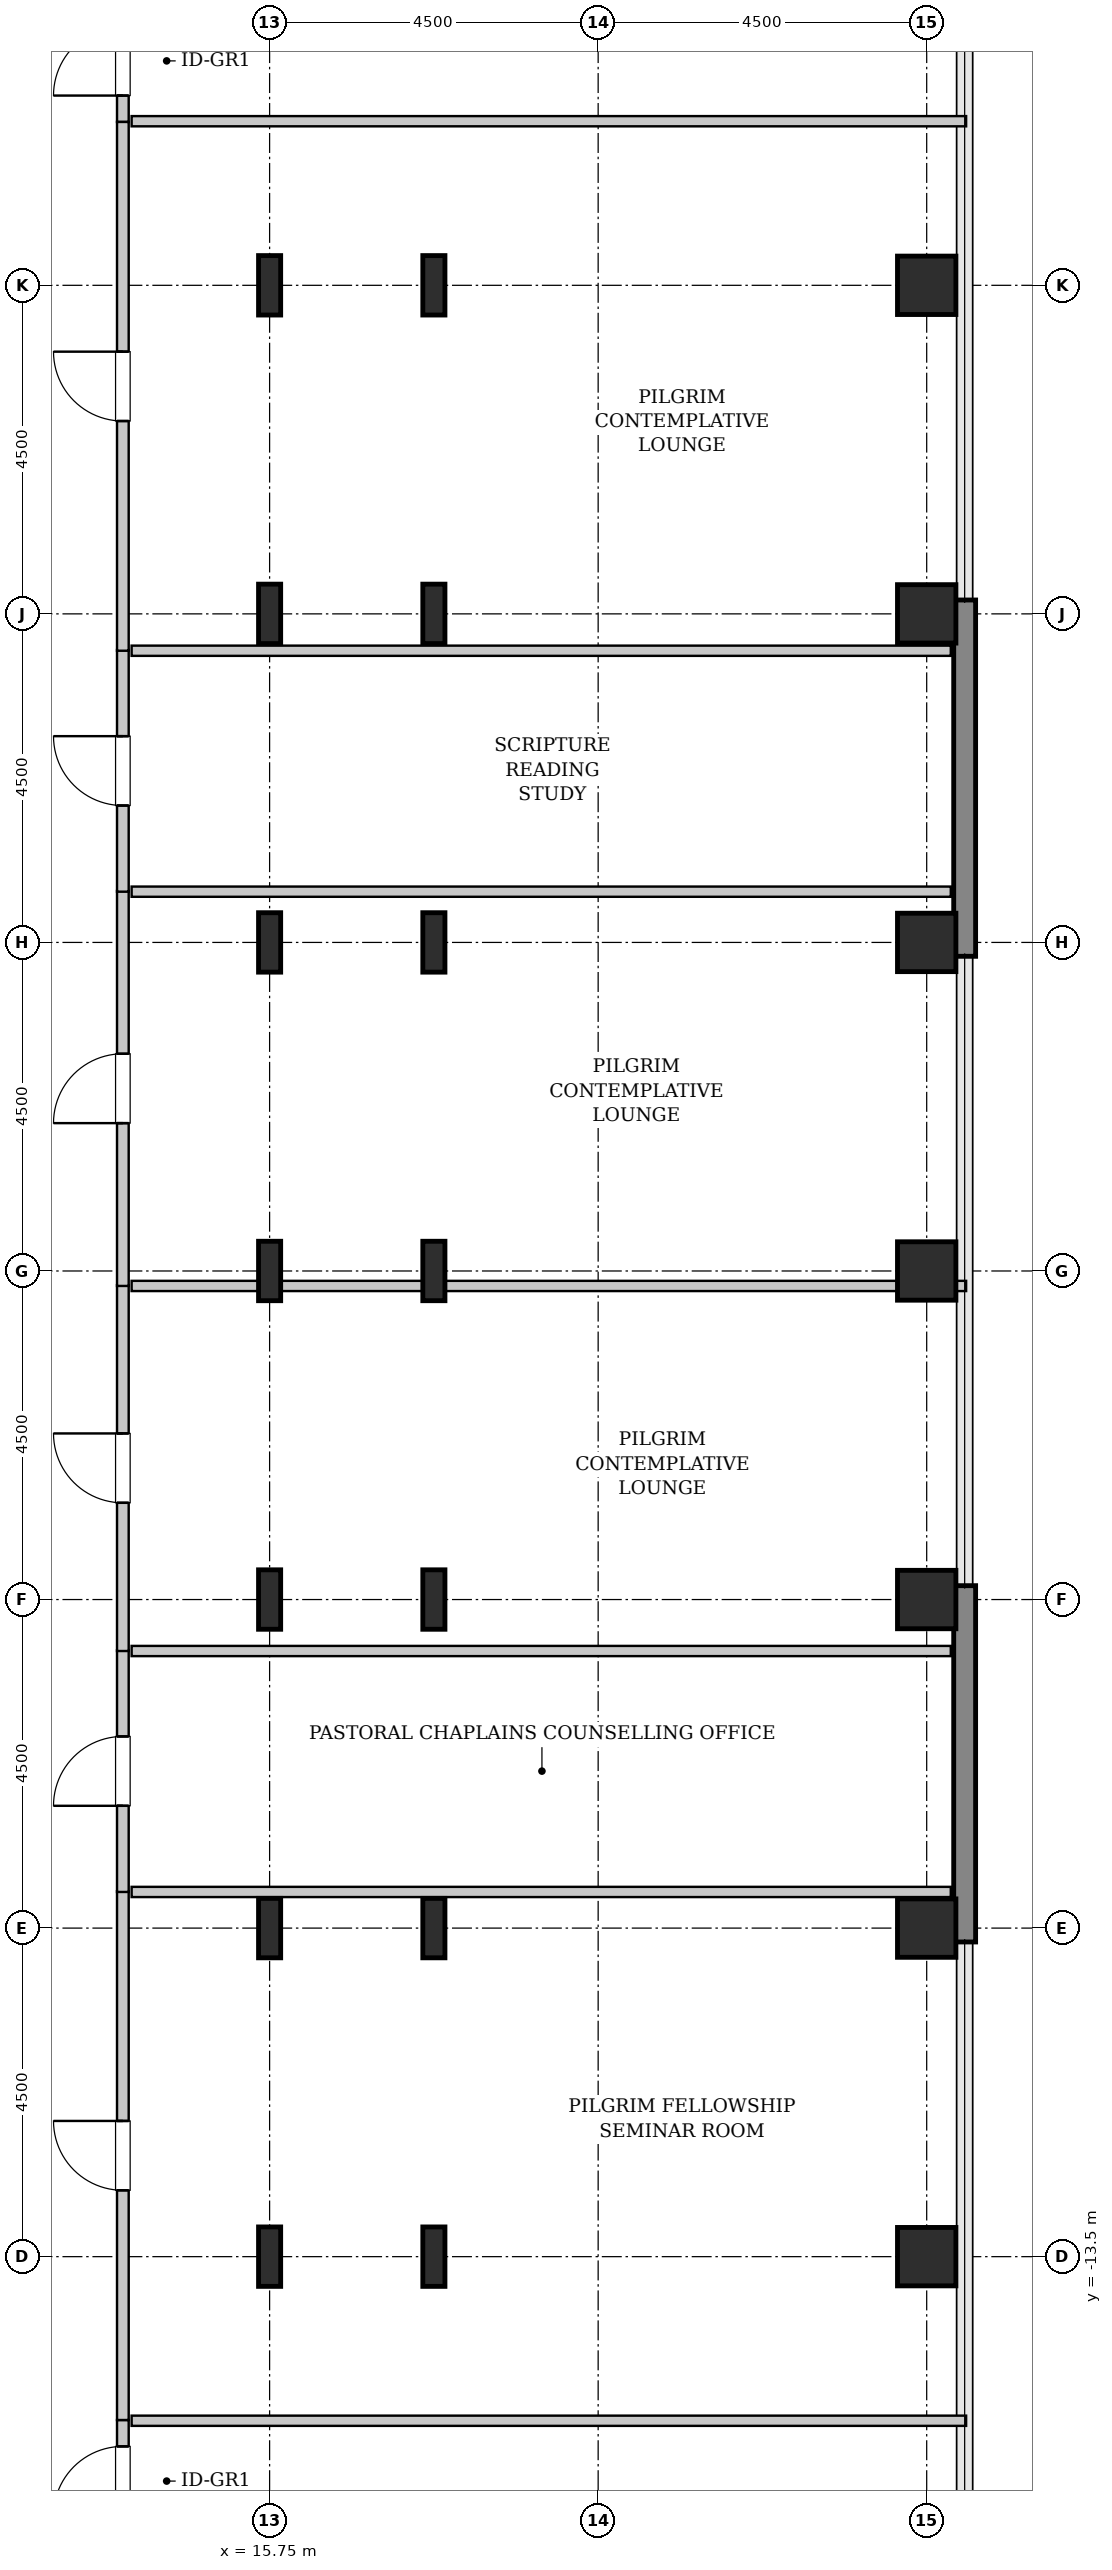
"""IFC4 building model, lengths in metres.
Left out: names, types, materials, properties, quantities, classifications, styles, units other than length and angle.
Written with IfcOpenShell. Run it as: python <this file> out.ifc"""

import sys

from ifc_helpers import new_model, si_unit, direction, frame, frame_2d, origin, origin_2d, place, context, subcontext, project, spatial, rectangle, hollow_rectangle, i_section, extrude, source, transform, mapped, element, fill, save


model = new_model("IFC4")
c1 = context("Model", 3, precision=1e-05, world=origin(), true_north=direction((0.0, 1.0)))
c2 = subcontext(c1, "Body", "Model", "MODEL_VIEW")
j1 = project(units=[si_unit("LENGTHUNIT", "METRE"), si_unit("PLANEANGLEUNIT", "RADIAN")], contexts=[c1])
p1 = place(None, origin())
s1 = spatial("IfcSite", under=j1, at=p1, CompositionType="ELEMENT")
p2 = place(p1, origin())
s2 = spatial("IfcBuilding", under=s1, at=p2, CompositionType="ELEMENT")
p3 = place(p2, frame((0.0, 0.0, 171.6)))
s3 = spatial("IfcBuildingStorey", under=s2, at=p3, CompositionType="ELEMENT", Elevation=171.6)
m1 = source(origin(), c2, "Body", "SweptSolid", [
    extrude(i_section(OverallWidth=0.303, OverallDepth=0.814, WebThickness=0.021, FlangeThickness=0.04, FilletRadius=0.03, at=origin_2d()), origin(), (0.0, 0.0, 1.0), 3.8),
])
for number, where, z_axis, x_axis in (
    (1, (15.75, -13.5, 0.0), (0.0, 0.0, 1.0), (1.0, 0.0, 0.0)),
    (2, (15.75, -9.0, 0.0), (0.0, 0.0, 1.0), (1.0, 0.0, 0.0)),
    (3, (15.75, -4.5, 0.0), (0.0, 0.0, 1.0), (1.0, 0.0, 0.0)),
    (4, (15.75, 0.0, 0.0), (0.0, 0.0, 1.0), (1.0, 0.0, 0.0)),
    (5, (15.75, 4.5, 0.0), (0.0, 0.0, 1.0), (1.0, 0.0, 0.0)),
    (6, (15.75, 9.0, 0.0), (0.0, 0.0, 1.0), (1.0, 0.0, 0.0)),
    (7, (15.75, 13.5, 0.0), (0.0, 0.0, 1.0), (1.0, 0.0, 0.0)),
    (8, (18.0, -13.5, 0.0), (0.0, 0.0, 1.0), (1.0, 0.0, 0.0)),
    (9, (18.0, -9.0, 0.0), (0.0, 0.0, 1.0), (1.0, 0.0, 0.0)),
    (10, (18.0, -4.5, 0.0), (0.0, 0.0, 1.0), (1.0, 0.0, 0.0)),
    (11, (18.0, 0.0, 0.0), (0.0, 0.0, 1.0), (1.0, 0.0, 0.0)),
    (12, (18.0, 4.5, 0.0), (0.0, 0.0, 1.0), (1.0, 0.0, 0.0)),
    (13, (18.0, 9.0, 0.0), (0.0, 0.0, 1.0), (1.0, 0.0, 0.0)),
    (14, (18.0, 13.5, 0.0), (0.0, 0.0, 1.0), (1.0, 0.0, 0.0)),
):
    element("IfcColumn", number, at=place(p3, frame(where, z_axis=z_axis, x_axis=x_axis)), inside=s3, PredefinedType="COLUMN", context=c2, shape_type="MappedRepresentation", body=[
        mapped(m1, transform((0.0, 0.0, 0.0), x_axis=(1.0, 0.0, 0.0), y_axis=(0.0, 1.0, 0.0), z_axis=(0.0, 0.0, 1.0), scale=1.0)),
    ])
m2 = source(origin(), c2, "Body", "SweptSolid", [
    extrude(hollow_rectangle(XDim=0.8, YDim=0.8, WallThickness=0.04, InnerFilletRadius=0.04, OuterFilletRadius=0.08, at=origin_2d()), origin(), (0.0, 0.0, 1.0), 3.8),
])
for number, where, z_axis, x_axis in (
    (15, (24.75, -13.5, 0.0), (0.0, 0.0, 1.0), (1.0, 0.0, 0.0)),
    (16, (24.75, -9.0, 0.0), (0.0, 0.0, 1.0), (1.0, 0.0, 0.0)),
    (17, (24.75, -4.5, 0.0), (0.0, 0.0, 1.0), (1.0, 0.0, 0.0)),
    (18, (24.75, 0.0, 0.0), (0.0, 0.0, 1.0), (1.0, 0.0, 0.0)),
    (19, (24.75, 4.5, 0.0), (0.0, 0.0, 1.0), (1.0, 0.0, 0.0)),
    (20, (24.75, 9.0, 0.0), (0.0, 0.0, 1.0), (1.0, 0.0, 0.0)),
    (21, (24.75, 13.5, 0.0), (0.0, 0.0, 1.0), (1.0, 0.0, 0.0)),
):
    element("IfcColumn", number, at=place(p3, frame(where, z_axis=z_axis, x_axis=x_axis)), inside=s3, PredefinedType="COLUMN", context=c2, shape_type="MappedRepresentation", body=[
        mapped(m2, transform((0.0, 0.0, 0.0), x_axis=(1.0, 0.0, 0.0), y_axis=(0.0, 1.0, 0.0), z_axis=(0.0, 0.0, 1.0), scale=1.0)),
    ])
m3 = source(origin(), c2, "Body", "SweptSolid", [
    extrude(rectangle(XDim=4.88, YDim=0.3, at=frame_2d((2.44, 0.0))), origin(), (0.0, 0.0, 1.0), 3.55),
])
for number, where, z_axis, x_axis in (
    (22, (25.27, -9.19, 0.0), (0.0, 0.0, 1.0), (0.0, 1.0, 0.0)),
    (23, (25.27, 4.31, 0.0), (0.0, 0.0, 1.0), (0.0, 1.0, 0.0)),
):
    element("IfcWall", number, at=place(p3, frame(where, z_axis=z_axis, x_axis=x_axis)), inside=s3, PredefinedType="SHEAR", context=c2, shape_type="MappedRepresentation", body=[
        mapped(m3, transform((0.0, 0.0, 0.0), x_axis=(1.0, 0.0, 0.0), y_axis=(0.0, 1.0, 0.0), z_axis=(0.0, 0.0, 1.0), scale=1.0)),
    ])
m4 = source(origin(), c2, "Body", "SweptSolid", [
    extrude(rectangle(XDim=7.302, YDim=0.16, at=frame_2d((3.651, 0.0))), origin(), (0.0, 0.0, 1.0), 3.535),
])
p4 = place(p3, frame((13.74, -23.04, 0.0), z_axis=(0.0, 0.0, 1.0), x_axis=(0.0, 1.0, 0.0)))
e24 = element("IfcWall", 24, at=p4, inside=s3, PredefinedType="PARTITIONING", context=c2, shape_type="MappedRepresentation", body=[
    mapped(m4, transform((0.0, 0.0, 0.0), x_axis=(1.0, 0.0, 0.0), y_axis=(0.0, 1.0, 0.0), z_axis=(0.0, 0.0, 1.0), scale=1.0)),
])
p5 = place(p4, frame((5.991, 0.0, 0.0)))
e25 = element("IfcOpeningElement", 25, at=p5, cuts=e24, PredefinedType="OPENING", context=c2, shape_type="SweptSolid", body=[
    extrude(rectangle(XDim=0.95, YDim=2.1, at=frame_2d((0.475, 1.05))), frame((0.0, 0.09, 0.0), z_axis=(0.0, -1.0, 0.0), x_axis=(1.0, 0.0, 0.0)), (0.0, 0.0, 1.0), 0.18),
])
m5 = source(origin(), c2, "Body", "SweptSolid", [
    extrude(rectangle(XDim=11.43, YDim=0.14, at=frame_2d((5.715, 0.0))), origin(), (0.0, 0.0, 1.0), 3.535),
])
p6 = place(p3, frame((13.86, -15.748, 0.0), z_axis=(0.0, 0.0, 1.0), x_axis=(1.0, 0.0, 0.0)))
e26 = element("IfcWall", 26, at=p6, inside=s3, PredefinedType="PARTITIONING", context=c2, shape_type="MappedRepresentation", body=[
    mapped(m5, transform((0.0, 0.0, 0.0), x_axis=(1.0, 0.0, 0.0), y_axis=(0.0, 1.0, 0.0), z_axis=(0.0, 0.0, 1.0), scale=1.0)),
])
m6 = source(origin(), c2, "Body", "SweptSolid", [
    extrude(rectangle(XDim=7.242, YDim=0.16, at=frame_2d((3.621, 0.0))), origin(), (0.0, 0.0, 1.0), 3.535),
])
p7 = place(p3, frame((13.74, -15.738, 0.0), z_axis=(0.0, 0.0, 1.0), x_axis=(0.0, 1.0, 0.0)))
e27 = element("IfcWall", 27, at=p7, inside=s3, PredefinedType="PARTITIONING", context=c2, shape_type="MappedRepresentation", body=[
    mapped(m6, transform((0.0, 0.0, 0.0), x_axis=(1.0, 0.0, 0.0), y_axis=(0.0, 1.0, 0.0), z_axis=(0.0, 0.0, 1.0), scale=1.0)),
])
p8 = place(p7, frame((3.146, 0.0, 0.0)))
e28 = element("IfcOpeningElement", 28, at=p8, cuts=e27, PredefinedType="OPENING", context=c2, shape_type="SweptSolid", body=[
    extrude(rectangle(XDim=0.95, YDim=2.1, at=frame_2d((0.475, 1.05))), frame((0.0, 0.09, 0.0), z_axis=(0.0, -1.0, 0.0), x_axis=(1.0, 0.0, 0.0)), (0.0, 0.0, 1.0), 0.18),
])
m7 = source(origin(), c2, "Body", "SweptSolid", [
    extrude(rectangle(XDim=11.22, YDim=0.14, at=frame_2d((5.61, 0.0))), origin(), (0.0, 0.0, 1.0), 2.875),
])
p9 = place(p3, frame((13.86, -8.505, 0.0), z_axis=(0.0, 0.0, 1.0), x_axis=(1.0, 0.0, 0.0)))
e29 = element("IfcWall", 29, at=p9, inside=s3, PredefinedType="PARTITIONING", context=c2, shape_type="MappedRepresentation", body=[
    mapped(m7, transform((0.0, 0.0, 0.0), x_axis=(1.0, 0.0, 0.0), y_axis=(0.0, 1.0, 0.0), z_axis=(0.0, 0.0, 1.0), scale=1.0)),
])
m8 = source(origin(), c2, "Body", "SweptSolid", [
    extrude(rectangle(XDim=3.31, YDim=0.16, at=frame_2d((1.655, 0.0))), origin(), (0.0, 0.0, 1.0), 3.535),
])
p10 = place(p3, frame((13.74, -8.505, 0.0), z_axis=(0.0, 0.0, 1.0), x_axis=(0.0, 1.0, 0.0)))
e30 = element("IfcWall", 30, at=p10, inside=s3, PredefinedType="PARTITIONING", context=c2, shape_type="MappedRepresentation", body=[
    mapped(m8, transform((0.0, 0.0, 0.0), x_axis=(1.0, 0.0, 0.0), y_axis=(0.0, 1.0, 0.0), z_axis=(0.0, 0.0, 1.0), scale=1.0)),
])
p11 = place(p10, frame((1.18, 0.0, 0.0)))
e31 = element("IfcOpeningElement", 31, at=p11, cuts=e30, PredefinedType="OPENING", context=c2, shape_type="SweptSolid", body=[
    extrude(rectangle(XDim=0.95, YDim=2.1, at=frame_2d((0.475, 1.05))), frame((0.0, 0.09, 0.0), z_axis=(0.0, -1.0, 0.0), x_axis=(1.0, 0.0, 0.0)), (0.0, 0.0, 1.0), 0.18),
])
m9 = source(origin(), c2, "Body", "SweptSolid", [
    extrude(rectangle(XDim=11.22, YDim=0.14, at=frame_2d((5.61, 0.0))), origin(), (0.0, 0.0, 1.0), 3.535),
])
p12 = place(p3, frame((13.86, -5.205, 0.0), z_axis=(0.0, 0.0, 1.0), x_axis=(1.0, 0.0, 0.0)))
e32 = element("IfcWall", 32, at=p12, inside=s3, PredefinedType="PARTITIONING", context=c2, shape_type="MappedRepresentation", body=[
    mapped(m9, transform((0.0, 0.0, 0.0), x_axis=(1.0, 0.0, 0.0), y_axis=(0.0, 1.0, 0.0), z_axis=(0.0, 0.0, 1.0), scale=1.0)),
])
m10 = source(origin(), c2, "Body", "SweptSolid", [
    extrude(rectangle(XDim=5.01, YDim=0.16, at=frame_2d((2.505, 0.0))), origin(), (0.0, 0.0, 1.0), 3.535),
])
p13 = place(p3, frame((13.74, -5.205, 0.0), z_axis=(0.0, 0.0, 1.0), x_axis=(0.0, 1.0, 0.0)))
e33 = element("IfcWall", 33, at=p13, inside=s3, PredefinedType="PARTITIONING", context=c2, shape_type="MappedRepresentation", body=[
    mapped(m10, transform((0.0, 0.0, 0.0), x_axis=(1.0, 0.0, 0.0), y_axis=(0.0, 1.0, 0.0), z_axis=(0.0, 0.0, 1.0), scale=1.0)),
])
p14 = place(p13, frame((2.03, 0.0, 0.0)))
e34 = element("IfcOpeningElement", 34, at=p14, cuts=e33, PredefinedType="OPENING", context=c2, shape_type="SweptSolid", body=[
    extrude(rectangle(XDim=0.95, YDim=2.1, at=frame_2d((0.475, 1.05))), frame((0.0, 0.09, 0.0), z_axis=(0.0, -1.0, 0.0), x_axis=(1.0, 0.0, 0.0)), (0.0, 0.0, 1.0), 0.18),
])
m11 = source(origin(), c2, "Body", "SweptSolid", [
    extrude(rectangle(XDim=11.43, YDim=0.14, at=frame_2d((5.715, 0.0))), origin(), (0.0, 0.0, 1.0), 2.875),
])
p15 = place(p3, frame((13.86, -0.205, 0.0), z_axis=(0.0, 0.0, 1.0), x_axis=(1.0, 0.0, 0.0)))
e35 = element("IfcWall", 35, at=p15, inside=s3, PredefinedType="PARTITIONING", context=c2, shape_type="MappedRepresentation", body=[
    mapped(m11, transform((0.0, 0.0, 0.0), x_axis=(1.0, 0.0, 0.0), y_axis=(0.0, 1.0, 0.0), z_axis=(0.0, 0.0, 1.0), scale=1.0)),
])
m12 = source(origin(), c2, "Body", "SweptSolid", [
    extrude(rectangle(XDim=5.41, YDim=0.16, at=frame_2d((2.705, 0.0))), origin(), (0.0, 0.0, 1.0), 3.535),
])
p16 = place(p3, frame((13.74, -0.205, 0.0), z_axis=(0.0, 0.0, 1.0), x_axis=(0.0, 1.0, 0.0)))
e36 = element("IfcWall", 36, at=p16, inside=s3, PredefinedType="PARTITIONING", context=c2, shape_type="MappedRepresentation", body=[
    mapped(m12, transform((0.0, 0.0, 0.0), x_axis=(1.0, 0.0, 0.0), y_axis=(0.0, 1.0, 0.0), z_axis=(0.0, 0.0, 1.0), scale=1.0)),
])
p17 = place(p16, frame((2.23, 0.0, 0.0)))
e37 = element("IfcOpeningElement", 37, at=p17, cuts=e36, PredefinedType="OPENING", context=c2, shape_type="SweptSolid", body=[
    extrude(rectangle(XDim=0.95, YDim=2.1, at=frame_2d((0.475, 1.05))), frame((0.0, 0.09, 0.0), z_axis=(0.0, -1.0, 0.0), x_axis=(1.0, 0.0, 0.0)), (0.0, 0.0, 1.0), 0.18),
])
p18 = place(p3, frame((13.86, 5.195, 0.0), z_axis=(0.0, 0.0, 1.0), x_axis=(1.0, 0.0, 0.0)))
e38 = element("IfcWall", 38, at=p18, inside=s3, PredefinedType="PARTITIONING", context=c2, shape_type="MappedRepresentation", body=[
    mapped(m9, transform((0.0, 0.0, 0.0), x_axis=(1.0, 0.0, 0.0), y_axis=(0.0, 1.0, 0.0), z_axis=(0.0, 0.0, 1.0), scale=1.0)),
])
p19 = place(p3, frame((13.74, 5.195, 0.0), z_axis=(0.0, 0.0, 1.0), x_axis=(0.0, 1.0, 0.0)))
e39 = element("IfcWall", 39, at=p19, inside=s3, PredefinedType="PARTITIONING", context=c2, shape_type="MappedRepresentation", body=[
    mapped(m8, transform((0.0, 0.0, 0.0), x_axis=(1.0, 0.0, 0.0), y_axis=(0.0, 1.0, 0.0), z_axis=(0.0, 0.0, 1.0), scale=1.0)),
])
p20 = place(p19, frame((1.18, 0.0, 0.0)))
e40 = element("IfcOpeningElement", 40, at=p20, cuts=e39, PredefinedType="OPENING", context=c2, shape_type="SweptSolid", body=[
    extrude(rectangle(XDim=0.95, YDim=2.1, at=frame_2d((0.475, 1.05))), frame((0.0, 0.09, 0.0), z_axis=(0.0, -1.0, 0.0), x_axis=(1.0, 0.0, 0.0)), (0.0, 0.0, 1.0), 0.18),
])
p21 = place(p3, frame((13.86, 8.495, 0.0), z_axis=(0.0, 0.0, 1.0), x_axis=(1.0, 0.0, 0.0)))
e41 = element("IfcWall", 41, at=p21, inside=s3, PredefinedType="PARTITIONING", context=c2, shape_type="MappedRepresentation", body=[
    mapped(m7, transform((0.0, 0.0, 0.0), x_axis=(1.0, 0.0, 0.0), y_axis=(0.0, 1.0, 0.0), z_axis=(0.0, 0.0, 1.0), scale=1.0)),
])
p22 = place(p3, frame((13.74, 15.738, 0.0), z_axis=(0.0, 0.0, 1.0), x_axis=(0.0, 1.0, 0.0)))
e42 = element("IfcWall", 42, at=p22, inside=s3, PredefinedType="PARTITIONING", context=c2, shape_type="MappedRepresentation", body=[
    mapped(m4, transform((0.0, 0.0, 0.0), x_axis=(1.0, 0.0, 0.0), y_axis=(0.0, 1.0, 0.0), z_axis=(0.0, 0.0, 1.0), scale=1.0)),
])
p23 = place(p22, frame((0.361, 0.0, 0.0)))
e43 = element("IfcOpeningElement", 43, at=p23, cuts=e42, PredefinedType="OPENING", context=c2, shape_type="SweptSolid", body=[
    extrude(rectangle(XDim=0.95, YDim=2.1, at=frame_2d((0.475, 1.05))), frame((0.0, 0.09, 0.0), z_axis=(0.0, -1.0, 0.0), x_axis=(1.0, 0.0, 0.0)), (0.0, 0.0, 1.0), 0.18),
])
p24 = place(p3, frame((13.86, 15.748, 0.0), z_axis=(0.0, 0.0, 1.0), x_axis=(1.0, 0.0, 0.0)))
e44 = element("IfcWall", 44, at=p24, inside=s3, PredefinedType="PARTITIONING", context=c2, shape_type="MappedRepresentation", body=[
    mapped(m5, transform((0.0, 0.0, 0.0), x_axis=(1.0, 0.0, 0.0), y_axis=(0.0, 1.0, 0.0), z_axis=(0.0, 0.0, 1.0), scale=1.0)),
])
p25 = place(p3, frame((13.74, 8.495, 0.0), z_axis=(0.0, 0.0, 1.0), x_axis=(0.0, 1.0, 0.0)))
e45 = element("IfcWall", 45, at=p25, inside=s3, PredefinedType="PARTITIONING", context=c2, shape_type="MappedRepresentation", body=[
    mapped(m6, transform((0.0, 0.0, 0.0), x_axis=(1.0, 0.0, 0.0), y_axis=(0.0, 1.0, 0.0), z_axis=(0.0, 0.0, 1.0), scale=1.0)),
])
p26 = place(p25, frame((3.146, 0.0, 0.0)))
e46 = element("IfcOpeningElement", 46, at=p26, cuts=e45, PredefinedType="OPENING", context=c2, shape_type="SweptSolid", body=[
    extrude(rectangle(XDim=0.95, YDim=2.1, at=frame_2d((0.475, 1.05))), frame((0.0, 0.09, 0.0), z_axis=(0.0, -1.0, 0.0), x_axis=(1.0, 0.0, 0.0)), (0.0, 0.0, 1.0), 0.18),
])
m13 = source(origin(), c2, "Body", "SweptSolid", [
    extrude(rectangle(XDim=0.95, YDim=2.1, at=frame_2d((0.475, 1.05))), frame((0.0, 0.025, 0.0), z_axis=(0.0, -1.0, 0.0), x_axis=(1.0, 0.0, 0.0)), (0.0, 0.0, 1.0), 0.05),
])
p27 = place(p5, origin())
e47 = element("IfcDoor", 47, at=p27, inside=s3, OperationType="SINGLE_SWING_LEFT", PredefinedType="DOOR", context=c2, shape_type="MappedRepresentation", body=[
    mapped(m13, transform((0.0, 0.0, 0.0), x_axis=(1.0, 0.0, 0.0), y_axis=(0.0, 1.0, 0.0), z_axis=(0.0, 0.0, 1.0), scale=1.0)),
])
fill(e25, e47)
p28 = place(p8, origin())
e48 = element("IfcDoor", 48, at=p28, inside=s3, OperationType="SINGLE_SWING_RIGHT", PredefinedType="DOOR", context=c2, shape_type="MappedRepresentation", body=[
    mapped(m13, transform((0.0, 0.0, 0.0), x_axis=(1.0, 0.0, 0.0), y_axis=(0.0, 1.0, 0.0), z_axis=(0.0, 0.0, 1.0), scale=1.0)),
])
fill(e28, e48)
p29 = place(p11, origin())
e49 = element("IfcDoor", 49, at=p29, inside=s3, OperationType="SINGLE_SWING_LEFT", PredefinedType="DOOR", context=c2, shape_type="MappedRepresentation", body=[
    mapped(m13, transform((0.0, 0.0, 0.0), x_axis=(1.0, 0.0, 0.0), y_axis=(0.0, 1.0, 0.0), z_axis=(0.0, 0.0, 1.0), scale=1.0)),
])
fill(e31, e49)
p30 = place(p14, origin())
e50 = element("IfcDoor", 50, at=p30, inside=s3, OperationType="SINGLE_SWING_RIGHT", PredefinedType="DOOR", context=c2, shape_type="MappedRepresentation", body=[
    mapped(m13, transform((0.0, 0.0, 0.0), x_axis=(1.0, 0.0, 0.0), y_axis=(0.0, 1.0, 0.0), z_axis=(0.0, 0.0, 1.0), scale=1.0)),
])
fill(e34, e50)
p31 = place(p17, origin())
e51 = element("IfcDoor", 51, at=p31, inside=s3, OperationType="SINGLE_SWING_LEFT", PredefinedType="DOOR", context=c2, shape_type="MappedRepresentation", body=[
    mapped(m13, transform((0.0, 0.0, 0.0), x_axis=(1.0, 0.0, 0.0), y_axis=(0.0, 1.0, 0.0), z_axis=(0.0, 0.0, 1.0), scale=1.0)),
])
fill(e37, e51)
p32 = place(p20, origin())
e52 = element("IfcDoor", 52, at=p32, inside=s3, OperationType="SINGLE_SWING_RIGHT", PredefinedType="DOOR", context=c2, shape_type="MappedRepresentation", body=[
    mapped(m13, transform((0.0, 0.0, 0.0), x_axis=(1.0, 0.0, 0.0), y_axis=(0.0, 1.0, 0.0), z_axis=(0.0, 0.0, 1.0), scale=1.0)),
])
fill(e40, e52)
p33 = place(p23, origin())
e53 = element("IfcDoor", 53, at=p33, inside=s3, OperationType="SINGLE_SWING_LEFT", PredefinedType="DOOR", context=c2, shape_type="MappedRepresentation", body=[
    mapped(m13, transform((0.0, 0.0, 0.0), x_axis=(1.0, 0.0, 0.0), y_axis=(0.0, 1.0, 0.0), z_axis=(0.0, 0.0, 1.0), scale=1.0)),
])
fill(e43, e53)
p34 = place(p26, origin())
e54 = element("IfcDoor", 54, at=p34, inside=s3, OperationType="SINGLE_SWING_RIGHT", PredefinedType="DOOR", context=c2, shape_type="MappedRepresentation", body=[
    mapped(m13, transform((0.0, 0.0, 0.0), x_axis=(1.0, 0.0, 0.0), y_axis=(0.0, 1.0, 0.0), z_axis=(0.0, 0.0, 1.0), scale=1.0)),
])
fill(e46, e54)
save(model, sys.argv[1])
